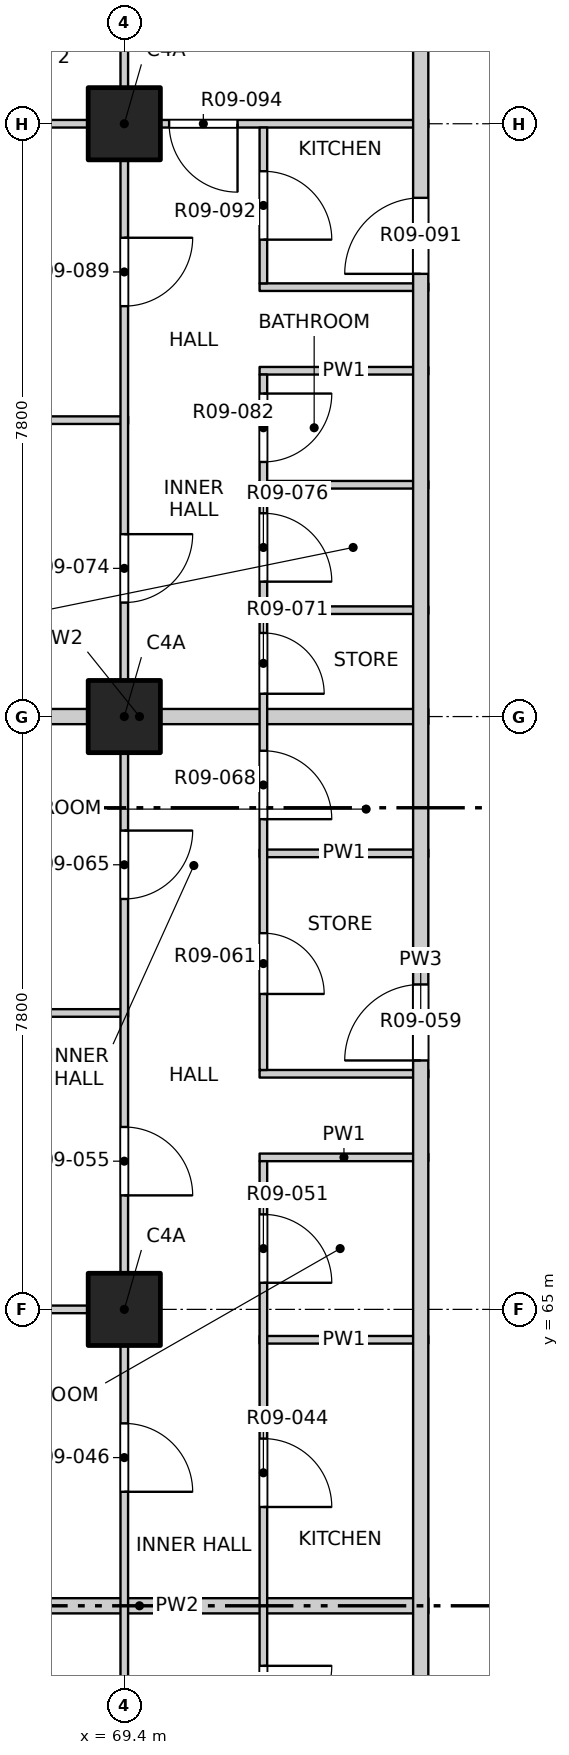
"""IFC4 building model, lengths in metres.
Left out: names, types, materials, properties, quantities, classifications, styles, units other than length and angle.
Written with IfcOpenShell. Run it as: python <this file> out.ifc"""

import sys

from ifc_helpers import new_model, si_unit, direction, frame, frame_2d, origin, origin_2d, place, context, subcontext, project, spatial, rectangle, extrude, element, fill, save


model = new_model("IFC4")
c1 = context("Model", 3, precision=1e-05, world=origin(), true_north=direction((0.0, 1.0)))
c2 = subcontext(c1, "Body", "Model", "MODEL_VIEW")
j1 = project(units=[si_unit("LENGTHUNIT", "METRE"), si_unit("PLANEANGLEUNIT", "RADIAN")], contexts=[c1])
p1 = place(None, origin())
s1 = spatial("IfcSite", under=j1, at=p1, CompositionType="ELEMENT")
p2 = place(p1, origin())
s2 = spatial("IfcBuilding", under=s1, at=p2, CompositionType="ELEMENT")
p3 = place(p2, frame((0.0, 0.0, 110.1)))
s3 = spatial("IfcBuildingStorey", under=s2, at=p3, CompositionType="ELEMENT", Elevation=110.1)
for number, where, z_axis, x_axis in (
    (1, (69.4, 65.0, -0.25), (0.0, 0.0, 1.0), (1.0, 0.0, 0.0)),
    (2, (69.4, 72.8, -0.25), (0.0, 0.0, 1.0), (1.0, 0.0, 0.0)),
    (3, (69.4, 80.6, -0.25), (0.0, 0.0, 1.0), (1.0, 0.0, 0.0)),
):
    element("IfcColumn", number, at=place(p3, frame(where, z_axis=z_axis, x_axis=x_axis)), inside=s3, PredefinedType="COLUMN", context=c2, shape_type="SweptSolid", body=[
        extrude(rectangle(XDim=0.95, YDim=0.95, at=origin_2d()), origin(), (0.0, 0.0, 1.0), 3.4),
    ])
p4 = place(p3, frame((65.8, 61.1, 0.0), z_axis=(0.0, 0.0, 1.0), x_axis=(1.0, 0.0, 0.0)))
e4 = element("IfcWall", 4, at=p4, inside=s3, PredefinedType="PARTITIONING", context=c2, shape_type="SweptSolid", body=[
    extrude(rectangle(XDim=7.6, YDim=0.2, at=frame_2d((3.8, 0.0))), origin(), (0.0, 0.0, 1.0), 2.55),
])
p5 = place(p3, frame((71.18, 64.6, 0.0), z_axis=(0.0, 0.0, 1.0), x_axis=(1.0, 0.0, 0.0)))
e5 = element("IfcWall", 5, at=p5, inside=s3, PredefinedType="PARTITIONING", context=c2, shape_type="SweptSolid", body=[
    extrude(rectangle(XDim=2.22, YDim=0.1, at=frame_2d((1.11, 0.0))), origin(), (0.0, 0.0, 1.0), 3.15),
])
p6 = place(p3, frame((65.8, 65.0, 0.0), z_axis=(0.0, 0.0, 1.0), x_axis=(1.0, 0.0, 0.0)))
e6 = element("IfcWall", 6, at=p6, inside=s3, PredefinedType="PARTITIONING", context=c2, shape_type="SweptSolid", body=[
    extrude(rectangle(XDim=3.65, YDim=0.1, at=frame_2d((1.825, 0.0))), origin(), (0.0, 0.0, 1.0), 3.15),
])
for number, where, z_axis, x_axis in (
    (7, (71.18, 67.0, 0.0), (0.0, 0.0, 1.0), (1.0, 0.0, 0.0)),
    (8, (71.18, 68.1, 0.0), (0.0, 0.0, 1.0), (1.0, 0.0, 0.0)),
):
    element("IfcWall", number, at=place(p3, frame(where, z_axis=z_axis, x_axis=x_axis)), inside=s3, PredefinedType="PARTITIONING", context=c2, shape_type="SweptSolid", body=[
        extrude(rectangle(XDim=2.22, YDim=0.1, at=frame_2d((1.11, 0.0))), origin(), (0.0, 0.0, 1.0), 3.15),
    ])
p7 = place(p3, frame((65.8, 68.9, 0.0), z_axis=(0.0, 0.0, 1.0), x_axis=(1.0, 0.0, 0.0)))
e9 = element("IfcWall", 9, at=p7, inside=s3, PredefinedType="PARTITIONING", context=c2, shape_type="SweptSolid", body=[
    extrude(rectangle(XDim=3.65, YDim=0.1, at=frame_2d((1.825, 0.0))), origin(), (0.0, 0.0, 1.0), 2.55),
])
p8 = place(p3, frame((71.18, 71.0, 0.0), z_axis=(0.0, 0.0, 1.0), x_axis=(1.0, 0.0, 0.0)))
e10 = element("IfcWall", 10, at=p8, inside=s3, PredefinedType="PARTITIONING", context=c2, shape_type="SweptSolid", body=[
    extrude(rectangle(XDim=2.22, YDim=0.1, at=frame_2d((1.11, 0.0))), origin(), (0.0, 0.0, 1.0), 3.15),
])
p9 = place(p3, frame((65.8, 72.8, 0.0), z_axis=(0.0, 0.0, 1.0), x_axis=(1.0, 0.0, 0.0)))
e11 = element("IfcWall", 11, at=p9, inside=s3, PredefinedType="PARTITIONING", context=c2, shape_type="SweptSolid", body=[
    extrude(rectangle(XDim=7.6, YDim=0.2, at=frame_2d((3.8, 0.0))), origin(), (0.0, 0.0, 1.0), 3.15),
])
for number, where, z_axis, x_axis in (
    (12, (71.18, 74.2, 0.0), (0.0, 0.0, 1.0), (1.0, 0.0, 0.0)),
    (13, (71.18, 75.85, 0.0), (0.0, 0.0, 1.0), (1.0, 0.0, 0.0)),
):
    element("IfcWall", number, at=place(p3, frame(where, z_axis=z_axis, x_axis=x_axis)), inside=s3, PredefinedType="PARTITIONING", context=c2, shape_type="SweptSolid", body=[
        extrude(rectangle(XDim=2.22, YDim=0.1, at=frame_2d((1.11, 0.0))), origin(), (0.0, 0.0, 1.0), 3.15),
    ])
p10 = place(p3, frame((65.8, 76.7, 0.0), z_axis=(0.0, 0.0, 1.0), x_axis=(1.0, 0.0, 0.0)))
e14 = element("IfcWall", 14, at=p10, inside=s3, PredefinedType="PARTITIONING", context=c2, shape_type="SweptSolid", body=[
    extrude(rectangle(XDim=3.65, YDim=0.1, at=frame_2d((1.825, 0.0))), origin(), (0.0, 0.0, 1.0), 2.55),
])
for number, where, z_axis, x_axis in (
    (15, (71.18, 77.35, 0.0), (0.0, 0.0, 1.0), (1.0, 0.0, 0.0)),
    (16, (71.18, 78.45, 0.0), (0.0, 0.0, 1.0), (1.0, 0.0, 0.0)),
):
    element("IfcWall", number, at=place(p3, frame(where, z_axis=z_axis, x_axis=x_axis)), inside=s3, PredefinedType="PARTITIONING", context=c2, shape_type="SweptSolid", body=[
        extrude(rectangle(XDim=2.22, YDim=0.1, at=frame_2d((1.11, 0.0))), origin(), (0.0, 0.0, 1.0), 3.15),
    ])
p11 = place(p3, frame((65.8, 80.6, 0.0), z_axis=(0.0, 0.0, 1.0), x_axis=(1.0, 0.0, 0.0)))
e17 = element("IfcWall", 17, at=p11, inside=s3, PredefinedType="PARTITIONING", context=c2, shape_type="SweptSolid", body=[
    extrude(rectangle(XDim=7.6, YDim=0.1, at=frame_2d((3.8, 0.0))), origin(), (0.0, 0.0, 1.0), 3.15),
])
p12 = place(p11, frame((4.19, 0.0, 0.0)))
e18 = element("IfcOpeningElement", 18, at=p12, cuts=e17, PredefinedType="OPENING", context=c2, shape_type="SweptSolid", body=[
    extrude(rectangle(XDim=0.9, YDim=2.1, at=frame_2d((0.45, 1.05))), frame((0.0, 0.06, 0.0), z_axis=(0.0, -1.0, 0.0), x_axis=(1.0, 0.0, 0.0)), (0.0, 0.0, 1.0), 0.12),
])
p13 = place(p3, frame((69.4, 45.8, 0.0), z_axis=(0.0, 0.0, 1.0), x_axis=(0.0, 1.0, 0.0)))
e19 = element("IfcWall", 19, at=p13, inside=s3, PredefinedType="PARTITIONING", context=c2, shape_type="SweptSolid", body=[
    extrude(rectangle(XDim=38.4, YDim=0.1, at=frame_2d((19.2, 0.0))), origin(), (0.0, 0.0, 1.0), 3.15),
])
p14 = place(p13, frame((1.05, 0.0, 0.0)))
e20 = element("IfcOpeningElement", 20, at=p14, cuts=e19, PredefinedType="OPENING", context=c2, shape_type="SweptSolid", body=[
    extrude(rectangle(XDim=1.2, YDim=2.1, at=frame_2d((0.6, 1.05))), frame((0.0, 0.06, 0.0), z_axis=(0.0, -1.0, 0.0), x_axis=(1.0, 0.0, 0.0)), (0.0, 0.0, 1.0), 0.12),
])
p15 = place(p13, frame((5.1, 0.0, 0.0)))
e21 = element("IfcOpeningElement", 21, at=p15, cuts=e19, PredefinedType="OPENING", context=c2, shape_type="SweptSolid", body=[
    extrude(rectangle(XDim=0.9, YDim=2.1, at=frame_2d((0.45, 1.05))), frame((0.0, 0.06, 0.0), z_axis=(0.0, -1.0, 0.0), x_axis=(1.0, 0.0, 0.0)), (0.0, 0.0, 1.0), 0.12),
])
p16 = place(p13, frame((9.0, 0.0, 0.0)))
e22 = element("IfcOpeningElement", 22, at=p16, cuts=e19, PredefinedType="OPENING", context=c2, shape_type="SweptSolid", body=[
    extrude(rectangle(XDim=0.9, YDim=2.1, at=frame_2d((0.45, 1.05))), frame((0.0, 0.06, 0.0), z_axis=(0.0, -1.0, 0.0), x_axis=(1.0, 0.0, 0.0)), (0.0, 0.0, 1.0), 0.12),
])
p17 = place(p13, frame((12.9, 0.0, 0.0)))
e23 = element("IfcOpeningElement", 23, at=p17, cuts=e19, PredefinedType="OPENING", context=c2, shape_type="SweptSolid", body=[
    extrude(rectangle(XDim=0.9, YDim=2.1, at=frame_2d((0.45, 1.05))), frame((0.0, 0.06, 0.0), z_axis=(0.0, -1.0, 0.0), x_axis=(1.0, 0.0, 0.0)), (0.0, 0.0, 1.0), 0.12),
])
p18 = place(p13, frame((16.8, 0.0, 0.0)))
e24 = element("IfcOpeningElement", 24, at=p18, cuts=e19, PredefinedType="OPENING", context=c2, shape_type="SweptSolid", body=[
    extrude(rectangle(XDim=0.9, YDim=2.1, at=frame_2d((0.45, 1.05))), frame((0.0, 0.06, 0.0), z_axis=(0.0, -1.0, 0.0), x_axis=(1.0, 0.0, 0.0)), (0.0, 0.0, 1.0), 0.12),
])
p19 = place(p13, frame((20.7, 0.0, 0.0)))
e25 = element("IfcOpeningElement", 25, at=p19, cuts=e19, PredefinedType="OPENING", context=c2, shape_type="SweptSolid", body=[
    extrude(rectangle(XDim=0.9, YDim=2.1, at=frame_2d((0.45, 1.05))), frame((0.0, 0.06, 0.0), z_axis=(0.0, -1.0, 0.0), x_axis=(1.0, 0.0, 0.0)), (0.0, 0.0, 1.0), 0.12),
])
p20 = place(p13, frame((24.6, 0.0, 0.0)))
e26 = element("IfcOpeningElement", 26, at=p20, cuts=e19, PredefinedType="OPENING", context=c2, shape_type="SweptSolid", body=[
    extrude(rectangle(XDim=0.9, YDim=2.1, at=frame_2d((0.45, 1.05))), frame((0.0, 0.06, 0.0), z_axis=(0.0, -1.0, 0.0), x_axis=(1.0, 0.0, 0.0)), (0.0, 0.0, 1.0), 0.12),
])
p21 = place(p13, frame((28.5, 0.0, 0.0)))
e27 = element("IfcOpeningElement", 27, at=p21, cuts=e19, PredefinedType="OPENING", context=c2, shape_type="SweptSolid", body=[
    extrude(rectangle(XDim=0.9, YDim=2.1, at=frame_2d((0.45, 1.05))), frame((0.0, 0.06, 0.0), z_axis=(0.0, -1.0, 0.0), x_axis=(1.0, 0.0, 0.0)), (0.0, 0.0, 1.0), 0.12),
])
p22 = place(p13, frame((32.4, 0.0, 0.0)))
e28 = element("IfcOpeningElement", 28, at=p22, cuts=e19, PredefinedType="OPENING", context=c2, shape_type="SweptSolid", body=[
    extrude(rectangle(XDim=0.9, YDim=2.1, at=frame_2d((0.45, 1.05))), frame((0.0, 0.06, 0.0), z_axis=(0.0, -1.0, 0.0), x_axis=(1.0, 0.0, 0.0)), (0.0, 0.0, 1.0), 0.12),
])
p23 = place(p13, frame((36.15, 0.0, 0.0)))
e29 = element("IfcOpeningElement", 29, at=p23, cuts=e19, PredefinedType="OPENING", context=c2, shape_type="SweptSolid", body=[
    extrude(rectangle(XDim=1.2, YDim=2.1, at=frame_2d((0.6, 1.05))), frame((0.0, 0.06, 0.0), z_axis=(0.0, -1.0, 0.0), x_axis=(1.0, 0.0, 0.0)), (0.0, 0.0, 1.0), 0.12),
])
p24 = place(p3, frame((71.23, 55.3, 0.0), z_axis=(0.0, 0.0, 1.0), x_axis=(0.0, 1.0, 0.0)))
e30 = element("IfcWall", 30, at=p24, inside=s3, PredefinedType="PARTITIONING", context=c2, shape_type="SweptSolid", body=[
    extrude(rectangle(XDim=11.65, YDim=0.1, at=frame_2d((5.825, 0.0))), origin(), (0.0, 0.0, 1.0), 3.15),
])
p25 = place(p24, frame((1.185, 0.0, 0.0)))
e31 = element("IfcOpeningElement", 31, at=p25, cuts=e30, PredefinedType="OPENING", context=c2, shape_type="SweptSolid", body=[
    extrude(rectangle(XDim=0.9, YDim=2.1, at=frame_2d((0.45, 1.05))), frame((0.0, 0.06, 0.0), z_axis=(0.0, -1.0, 0.0), x_axis=(1.0, 0.0, 0.0)), (0.0, 0.0, 1.0), 0.12),
])
p26 = place(p24, frame((4.11, 0.0, 0.0)))
e32 = element("IfcOpeningElement", 32, at=p26, cuts=e30, PredefinedType="OPENING", context=c2, shape_type="SweptSolid", body=[
    extrude(rectangle(XDim=0.9, YDim=2.1, at=frame_2d((0.45, 1.05))), frame((0.0, 0.06, 0.0), z_axis=(0.0, -1.0, 0.0), x_axis=(1.0, 0.0, 0.0)), (0.0, 0.0, 1.0), 0.12),
])
p27 = place(p24, frame((7.1, 0.0, 0.0)))
e33 = element("IfcOpeningElement", 33, at=p27, cuts=e30, PredefinedType="OPENING", context=c2, shape_type="SweptSolid", body=[
    extrude(rectangle(XDim=0.9, YDim=2.1, at=frame_2d((0.45, 1.05))), frame((0.0, 0.06, 0.0), z_axis=(0.0, -1.0, 0.0), x_axis=(1.0, 0.0, 0.0)), (0.0, 0.0, 1.0), 0.12),
])
p28 = place(p24, frame((10.05, 0.0, 0.0)))
e34 = element("IfcOpeningElement", 34, at=p28, cuts=e30, PredefinedType="OPENING", context=c2, shape_type="SweptSolid", body=[
    extrude(rectangle(XDim=0.9, YDim=2.1, at=frame_2d((0.45, 1.05))), frame((0.0, 0.06, 0.0), z_axis=(0.0, -1.0, 0.0), x_axis=(1.0, 0.0, 0.0)), (0.0, 0.0, 1.0), 0.12),
])
p29 = place(p3, frame((71.23, 68.15, 0.0), z_axis=(0.0, 0.0, 1.0), x_axis=(0.0, 1.0, 0.0)))
e35 = element("IfcWall", 35, at=p29, inside=s3, PredefinedType="PARTITIONING", context=c2, shape_type="SweptSolid", body=[
    extrude(rectangle(XDim=9.15, YDim=0.1, at=frame_2d((4.575, 0.0))), origin(), (0.0, 0.0, 1.0), 3.15),
])
p30 = place(p29, frame((1.0, 0.0, 0.0)))
e36 = element("IfcOpeningElement", 36, at=p30, cuts=e35, PredefinedType="OPENING", context=c2, shape_type="SweptSolid", body=[
    extrude(rectangle(XDim=0.8, YDim=2.1, at=frame_2d((0.4, 1.05))), frame((0.0, 0.06, 0.0), z_axis=(0.0, -1.0, 0.0), x_axis=(1.0, 0.0, 0.0)), (0.0, 0.0, 1.0), 0.12),
])
p31 = place(p29, frame((3.3, 0.0, 0.0)))
e37 = element("IfcOpeningElement", 37, at=p31, cuts=e35, PredefinedType="OPENING", context=c2, shape_type="SweptSolid", body=[
    extrude(rectangle(XDim=0.9, YDim=2.1, at=frame_2d((0.45, 1.05))), frame((0.0, 0.06, 0.0), z_axis=(0.0, -1.0, 0.0), x_axis=(1.0, 0.0, 0.0)), (0.0, 0.0, 1.0), 0.12),
])
p32 = place(p29, frame((4.95, 0.0, 0.0)))
e38 = element("IfcOpeningElement", 38, at=p32, cuts=e35, PredefinedType="OPENING", context=c2, shape_type="SweptSolid", body=[
    extrude(rectangle(XDim=0.8, YDim=2.1, at=frame_2d((0.4, 1.05))), frame((0.0, 0.06, 0.0), z_axis=(0.0, -1.0, 0.0), x_axis=(1.0, 0.0, 0.0)), (0.0, 0.0, 1.0), 0.12),
])
p33 = place(p29, frame((6.425, 0.0, 0.0)))
e39 = element("IfcOpeningElement", 39, at=p33, cuts=e35, PredefinedType="OPENING", context=c2, shape_type="SweptSolid", body=[
    extrude(rectangle(XDim=0.9, YDim=2.1, at=frame_2d((0.45, 1.05))), frame((0.0, 0.06, 0.0), z_axis=(0.0, -1.0, 0.0), x_axis=(1.0, 0.0, 0.0)), (0.0, 0.0, 1.0), 0.12),
])
p34 = place(p29, frame((8.0, 0.0, 0.0)))
e40 = element("IfcOpeningElement", 40, at=p34, cuts=e35, PredefinedType="OPENING", context=c2, shape_type="SweptSolid", body=[
    extrude(rectangle(XDim=0.9, YDim=2.1, at=frame_2d((0.45, 1.05))), frame((0.0, 0.06, 0.0), z_axis=(0.0, -1.0, 0.0), x_axis=(1.0, 0.0, 0.0)), (0.0, 0.0, 1.0), 0.12),
])
p35 = place(p3, frame((71.23, 78.5, 0.0), z_axis=(0.0, 0.0, 1.0), x_axis=(0.0, 1.0, 0.0)))
e41 = element("IfcWall", 41, at=p35, inside=s3, PredefinedType="PARTITIONING", context=c2, shape_type="SweptSolid", body=[
    extrude(rectangle(XDim=2.05, YDim=0.1, at=frame_2d((1.025, 0.0))), origin(), (0.0, 0.0, 1.0), 3.15),
])
p36 = place(p35, frame((0.575, 0.0, 0.0)))
e42 = element("IfcOpeningElement", 42, at=p36, cuts=e41, PredefinedType="OPENING", context=c2, shape_type="SweptSolid", body=[
    extrude(rectangle(XDim=0.9, YDim=2.1, at=frame_2d((0.45, 1.05))), frame((0.0, 0.06, 0.0), z_axis=(0.0, -1.0, 0.0), x_axis=(1.0, 0.0, 0.0)), (0.0, 0.0, 1.0), 0.12),
])
p37 = place(p3, frame((73.3, 53.4, 0.0), z_axis=(0.0, 0.0, 1.0), x_axis=(0.0, 1.0, 0.0)))
e43 = element("IfcWall", 43, at=p37, inside=s3, PredefinedType="PARTITIONING", context=c2, shape_type="SweptSolid", body=[
    extrude(rectangle(XDim=30.8, YDim=0.2, at=frame_2d((15.4, 0.0))), origin(), (0.0, 0.0, 1.0), 3.15),
])
p38 = place(p37, frame((2.025, 0.0, 0.0)))
e44 = element("IfcOpeningElement", 44, at=p38, cuts=e43, PredefinedType="OPENING", context=c2, shape_type="SweptSolid", body=[
    extrude(rectangle(XDim=1.0, YDim=2.1, at=frame_2d((0.5, 1.05))), frame((0.0, 0.11, 0.0), z_axis=(0.0, -1.0, 0.0), x_axis=(1.0, 0.0, 0.0)), (0.0, 0.0, 1.0), 0.22),
])
p39 = place(p37, frame((14.875, 0.0, 0.0)))
e45 = element("IfcOpeningElement", 45, at=p39, cuts=e43, PredefinedType="OPENING", context=c2, shape_type="SweptSolid", body=[
    extrude(rectangle(XDim=1.0, YDim=2.1, at=frame_2d((0.5, 1.05))), frame((0.0, 0.11, 0.0), z_axis=(0.0, -1.0, 0.0), x_axis=(1.0, 0.0, 0.0)), (0.0, 0.0, 1.0), 0.22),
])
p40 = place(p37, frame((25.225, 0.0, 0.0)))
e46 = element("IfcOpeningElement", 46, at=p40, cuts=e43, PredefinedType="OPENING", context=c2, shape_type="SweptSolid", body=[
    extrude(rectangle(XDim=1.0, YDim=2.1, at=frame_2d((0.5, 1.05))), frame((0.0, 0.11, 0.0), z_axis=(0.0, -1.0, 0.0), x_axis=(1.0, 0.0, 0.0)), (0.0, 0.0, 1.0), 0.22),
])
p41 = place(p26, origin())
e47 = element("IfcDoor", 47, at=p41, inside=s3, OperationType="SINGLE_SWING_LEFT", PredefinedType="DOOR", context=c2, shape_type="SweptSolid", body=[
    extrude(rectangle(XDim=0.9, YDim=2.1, at=frame_2d((0.45, 1.05))), frame((0.0, 0.025, 0.0), z_axis=(0.0, -1.0, 0.0), x_axis=(1.0, 0.0, 0.0)), (0.0, 0.0, 1.0), 0.05),
])
fill(e32, e47)
p42 = place(p27, origin())
e48 = element("IfcDoor", 48, at=p42, inside=s3, OperationType="SINGLE_SWING_RIGHT", PredefinedType="DOOR", context=c2, shape_type="SweptSolid", body=[
    extrude(rectangle(XDim=0.9, YDim=2.1, at=frame_2d((0.45, 1.05))), frame((0.0, 0.025, 0.0), z_axis=(0.0, -1.0, 0.0), x_axis=(1.0, 0.0, 0.0)), (0.0, 0.0, 1.0), 0.05),
])
fill(e33, e48)
p43 = place(p18, origin())
e49 = element("IfcDoor", 49, at=p43, inside=s3, OperationType="SINGLE_SWING_RIGHT", PredefinedType="DOOR", context=c2, shape_type="SweptSolid", body=[
    extrude(rectangle(XDim=0.9, YDim=2.1, at=frame_2d((0.45, 1.05))), frame((0.0, 0.025, 0.0), z_axis=(0.0, -1.0, 0.0), x_axis=(1.0, 0.0, 0.0)), (0.0, 0.0, 1.0), 0.05),
])
fill(e24, e49)
p44 = place(p28, origin())
e50 = element("IfcDoor", 50, at=p44, inside=s3, OperationType="SINGLE_SWING_RIGHT", PredefinedType="DOOR", context=c2, shape_type="SweptSolid", body=[
    extrude(rectangle(XDim=0.9, YDim=2.1, at=frame_2d((0.45, 1.05))), frame((0.0, 0.025, 0.0), z_axis=(0.0, -1.0, 0.0), x_axis=(1.0, 0.0, 0.0)), (0.0, 0.0, 1.0), 0.05),
])
fill(e34, e50)
p45 = place(p19, origin())
e51 = element("IfcDoor", 51, at=p45, inside=s3, OperationType="SINGLE_SWING_RIGHT", PredefinedType="DOOR", context=c2, shape_type="SweptSolid", body=[
    extrude(rectangle(XDim=0.9, YDim=2.1, at=frame_2d((0.45, 1.05))), frame((0.0, 0.025, 0.0), z_axis=(0.0, -1.0, 0.0), x_axis=(1.0, 0.0, 0.0)), (0.0, 0.0, 1.0), 0.05),
])
fill(e25, e51)
p46 = place(p39, origin())
e52 = element("IfcDoor", 52, at=p46, inside=s3, OperationType="SINGLE_SWING_RIGHT", PredefinedType="DOOR", context=c2, shape_type="SweptSolid", body=[
    extrude(rectangle(XDim=1.0, YDim=2.1, at=frame_2d((0.5, 1.05))), frame((0.0, 0.025, 0.0), z_axis=(0.0, -1.0, 0.0), x_axis=(1.0, 0.0, 0.0)), (0.0, 0.0, 1.0), 0.05),
])
fill(e45, e52)
p47 = place(p30, origin())
e53 = element("IfcDoor", 53, at=p47, inside=s3, OperationType="SINGLE_SWING_RIGHT", PredefinedType="DOOR", context=c2, shape_type="SweptSolid", body=[
    extrude(rectangle(XDim=0.8, YDim=2.1, at=frame_2d((0.4, 1.05))), frame((0.0, 0.025, 0.0), z_axis=(0.0, -1.0, 0.0), x_axis=(1.0, 0.0, 0.0)), (0.0, 0.0, 1.0), 0.05),
])
fill(e36, e53)
p48 = place(p20, origin())
e54 = element("IfcDoor", 54, at=p48, inside=s3, OperationType="SINGLE_SWING_LEFT", PredefinedType="DOOR", context=c2, shape_type="SweptSolid", body=[
    extrude(rectangle(XDim=0.9, YDim=2.1, at=frame_2d((0.45, 1.05))), frame((0.0, 0.025, 0.0), z_axis=(0.0, -1.0, 0.0), x_axis=(1.0, 0.0, 0.0)), (0.0, 0.0, 1.0), 0.05),
])
fill(e26, e54)
p49 = place(p31, origin())
e55 = element("IfcDoor", 55, at=p49, inside=s3, OperationType="SINGLE_SWING_RIGHT", PredefinedType="DOOR", context=c2, shape_type="SweptSolid", body=[
    extrude(rectangle(XDim=0.9, YDim=2.1, at=frame_2d((0.45, 1.05))), frame((0.0, 0.025, 0.0), z_axis=(0.0, -1.0, 0.0), x_axis=(1.0, 0.0, 0.0)), (0.0, 0.0, 1.0), 0.05),
])
fill(e37, e55)
p50 = place(p32, origin())
e56 = element("IfcDoor", 56, at=p50, inside=s3, OperationType="SINGLE_SWING_RIGHT", PredefinedType="DOOR", context=c2, shape_type="SweptSolid", body=[
    extrude(rectangle(XDim=0.8, YDim=2.1, at=frame_2d((0.4, 1.05))), frame((0.0, 0.025, 0.0), z_axis=(0.0, -1.0, 0.0), x_axis=(1.0, 0.0, 0.0)), (0.0, 0.0, 1.0), 0.05),
])
fill(e38, e56)
p51 = place(p21, origin())
e57 = element("IfcDoor", 57, at=p51, inside=s3, OperationType="SINGLE_SWING_LEFT", PredefinedType="DOOR", context=c2, shape_type="SweptSolid", body=[
    extrude(rectangle(XDim=0.9, YDim=2.1, at=frame_2d((0.45, 1.05))), frame((0.0, 0.025, 0.0), z_axis=(0.0, -1.0, 0.0), x_axis=(1.0, 0.0, 0.0)), (0.0, 0.0, 1.0), 0.05),
])
fill(e27, e57)
p52 = place(p33, origin())
e58 = element("IfcDoor", 58, at=p52, inside=s3, OperationType="SINGLE_SWING_RIGHT", PredefinedType="DOOR", context=c2, shape_type="SweptSolid", body=[
    extrude(rectangle(XDim=0.9, YDim=2.1, at=frame_2d((0.45, 1.05))), frame((0.0, 0.025, 0.0), z_axis=(0.0, -1.0, 0.0), x_axis=(1.0, 0.0, 0.0)), (0.0, 0.0, 1.0), 0.05),
])
fill(e39, e58)
p53 = place(p34, origin())
e59 = element("IfcDoor", 59, at=p53, inside=s3, OperationType="SINGLE_SWING_LEFT", PredefinedType="DOOR", context=c2, shape_type="SweptSolid", body=[
    extrude(rectangle(XDim=0.9, YDim=2.1, at=frame_2d((0.45, 1.05))), frame((0.0, 0.025, 0.0), z_axis=(0.0, -1.0, 0.0), x_axis=(1.0, 0.0, 0.0)), (0.0, 0.0, 1.0), 0.05),
])
fill(e40, e59)
p54 = place(p22, origin())
e60 = element("IfcDoor", 60, at=p54, inside=s3, OperationType="SINGLE_SWING_LEFT", PredefinedType="DOOR", context=c2, shape_type="SweptSolid", body=[
    extrude(rectangle(XDim=0.9, YDim=2.1, at=frame_2d((0.45, 1.05))), frame((0.0, 0.025, 0.0), z_axis=(0.0, -1.0, 0.0), x_axis=(1.0, 0.0, 0.0)), (0.0, 0.0, 1.0), 0.05),
])
fill(e28, e60)
p55 = place(p40, origin())
e61 = element("IfcDoor", 61, at=p55, inside=s3, OperationType="SINGLE_SWING_RIGHT", PredefinedType="DOOR", context=c2, shape_type="SweptSolid", body=[
    extrude(rectangle(XDim=1.0, YDim=2.1, at=frame_2d((0.5, 1.05))), frame((0.0, 0.025, 0.0), z_axis=(0.0, -1.0, 0.0), x_axis=(1.0, 0.0, 0.0)), (0.0, 0.0, 1.0), 0.05),
])
fill(e46, e61)
p56 = place(p36, origin())
e62 = element("IfcDoor", 62, at=p56, inside=s3, OperationType="SINGLE_SWING_RIGHT", PredefinedType="DOOR", context=c2, shape_type="SweptSolid", body=[
    extrude(rectangle(XDim=0.9, YDim=2.1, at=frame_2d((0.45, 1.05))), frame((0.0, 0.025, 0.0), z_axis=(0.0, -1.0, 0.0), x_axis=(1.0, 0.0, 0.0)), (0.0, 0.0, 1.0), 0.05),
])
fill(e42, e62)
p57 = place(p12, origin())
e63 = element("IfcDoor", 63, at=p57, inside=s3, OperationType="SINGLE_SWING_LEFT", PredefinedType="DOOR", context=c2, shape_type="SweptSolid", body=[
    extrude(rectangle(XDim=0.9, YDim=2.1, at=frame_2d((0.45, 1.05))), frame((0.0, 0.025, 0.0), z_axis=(0.0, -1.0, 0.0), x_axis=(1.0, 0.0, 0.0)), (0.0, 0.0, 1.0), 0.05),
])
fill(e18, e63)
save(model, sys.argv[1])
